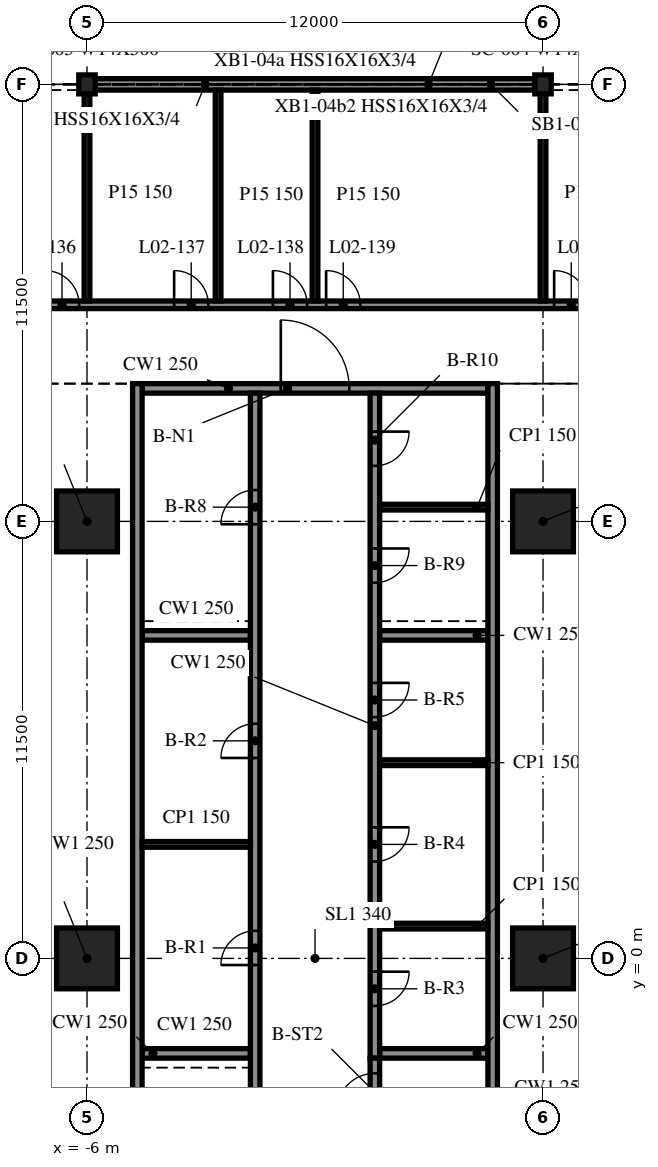
"""IFC4 building model, lengths in metres.
Left out: names, types, materials, properties, quantities, classifications, styles, units other than length and angle.
Written with IfcOpenShell. Run it as: python <this file> out.ifc"""

import sys

from ifc_helpers import new_model, si_unit, direction, frame, frame_2d, origin, origin_2d, place, context, subcontext, project, spatial, rectangle, i_section, extrude, element, fill, save


model = new_model("IFC4")
c1 = context("Model", 3, precision=1e-05, world=origin(), true_north=direction((0.0, 1.0)))
c2 = subcontext(c1, "Body", "Model", "MODEL_VIEW")
j1 = project(units=[si_unit("LENGTHUNIT", "METRE"), si_unit("PLANEANGLEUNIT", "RADIAN")], contexts=[c1])
p1 = place(None, origin())
s1 = spatial("IfcSite", under=j1, at=p1, CompositionType="ELEMENT")
p2 = place(p1, origin())
s2 = spatial("IfcBuilding", under=s1, at=p2, CompositionType="ELEMENT")
p3 = place(p2, frame((0.0, 0.0, 11.5)))
s3 = spatial("IfcBuildingStorey", under=s2, at=p3, CompositionType="ELEMENT", Elevation=11.5)
for number, where, z_axis, x_axis in (
    (1, (-6.0, 0.0, -0.34), (0.0, 0.0, 1.0), (1.0, 0.0, 0.0)),
    (2, (-6.0, 11.5, -0.34), (0.0, 0.0, 1.0), (1.0, 0.0, 0.0)),
    (3, (6.0, 0.0, -0.34), (0.0, 0.0, 1.0), (1.0, 0.0, 0.0)),
    (4, (6.0, 11.5, -0.34), (0.0, 0.0, 1.0), (1.0, 0.0, 0.0)),
):
    element("IfcColumn", number, at=place(p3, frame(where, z_axis=z_axis, x_axis=x_axis)), inside=s3, PredefinedType="COLUMN", context=c2, shape_type="SweptSolid", body=[
        extrude(rectangle(XDim=1.6, YDim=1.6, at=origin_2d()), origin(), (0.0, 0.0, 1.0), 4.3),
    ])
for number, where, z_axis, x_axis in (
    (5, (6.0, 23.0, -0.34), (0.0, 0.0, 1.0), (1.0, 0.0, 0.0)),
    (6, (-6.0, 23.0, -0.34), (0.0, 0.0, 1.0), (1.0, 0.0, 0.0)),
):
    element("IfcColumn", number, at=place(p3, frame(where, z_axis=z_axis, x_axis=x_axis)), inside=s3, PredefinedType="COLUMN", context=c2, shape_type="SweptSolid", body=[
        extrude(i_section(OverallWidth=0.432, OverallDepth=0.498, WebThickness=0.056, FlangeThickness=0.089, at=origin_2d()), origin(), (0.0, 0.0, 1.0), 4.3),
    ])
p4 = place(p3, frame((5.972, 23.0, 0.0), z_axis=(0.0, 0.0, 1.0), x_axis=(-1.0, 0.0, 0.0)))
e7 = element("IfcWall", 7, at=p4, inside=s3, PredefinedType="NOTDEFINED", context=c2, shape_type="SweptSolid", body=[
    extrude(rectangle(XDim=11.944, YDim=0.3, at=frame_2d((5.972, 0.0))), origin(), (0.0, 0.0, 1.0), 3.203),
])
for number, where, z_axis, x_axis in (
    (8, (-4.675, 15.125, 0.0), (0.0, 0.0, 1.0), (0.0, -1.0, 0.0)),
    (9, (4.675, -9.125, 0.0), (0.0, 0.0, 1.0), (0.0, 1.0, 0.0)),
):
    element("IfcWall", number, at=place(p3, frame(where, z_axis=z_axis, x_axis=x_axis)), inside=s3, PredefinedType="SOLIDWALL", context=c2, shape_type="SweptSolid", body=[
        extrude(rectangle(XDim=24.25, YDim=0.25, at=frame_2d((12.125, 0.0))), origin(), (0.0, 0.0, 1.0), 3.96),
    ])
p5 = place(p3, frame((-4.55, 15.0, 0.0), z_axis=(0.0, 0.0, 1.0), x_axis=(1.0, 0.0, 0.0)))
e10 = element("IfcWall", 10, at=p5, inside=s3, PredefinedType="SOLIDWALL", context=c2, shape_type="SweptSolid", body=[
    extrude(rectangle(XDim=9.1, YDim=0.25, at=frame_2d((4.55, 0.0))), origin(), (0.0, 0.0, 1.0), 3.96),
])
p6 = place(p5, frame((3.65, 0.0, 0.0)))
e11 = element("IfcOpeningElement", 11, at=p6, cuts=e10, PredefinedType="OPENING", context=c2, shape_type="SweptSolid", body=[
    extrude(rectangle(XDim=1.8, YDim=2.1, at=frame_2d((0.9, 1.05))), frame((0.0, 0.135, 0.0), z_axis=(0.0, -1.0, 0.0), x_axis=(1.0, 0.0, 0.0)), (0.0, 0.0, 1.0), 0.27),
])
p7 = place(p3, frame((-1.575, -8.875, 0.0), z_axis=(0.0, 0.0, 1.0), x_axis=(0.0, 1.0, 0.0)))
e12 = element("IfcWall", 12, at=p7, inside=s3, PredefinedType="SOLIDWALL", context=c2, shape_type="SweptSolid", body=[
    extrude(rectangle(XDim=23.75, YDim=0.25, at=frame_2d((11.875, 0.0))), origin(), (0.0, 0.0, 1.0), 3.96),
])
p8 = place(p7, frame((8.7, 0.0, 0.0)))
e13 = element("IfcOpeningElement", 13, at=p8, cuts=e12, PredefinedType="OPENING", context=c2, shape_type="SweptSolid", body=[
    extrude(rectangle(XDim=0.9, YDim=2.1, at=frame_2d((0.45, 1.05))), frame((0.0, 0.135, 0.0), z_axis=(0.0, -1.0, 0.0), x_axis=(1.0, 0.0, 0.0)), (0.0, 0.0, 1.0), 0.27),
])
p9 = place(p7, frame((14.15, 0.0, 0.0)))
e14 = element("IfcOpeningElement", 14, at=p9, cuts=e12, PredefinedType="OPENING", context=c2, shape_type="SweptSolid", body=[
    extrude(rectangle(XDim=0.9, YDim=2.1, at=frame_2d((0.45, 1.05))), frame((0.0, 0.135, 0.0), z_axis=(0.0, -1.0, 0.0), x_axis=(1.0, 0.0, 0.0)), (0.0, 0.0, 1.0), 0.27),
])
p10 = place(p7, frame((0.712, 0.0, 0.0)))
e15 = element("IfcOpeningElement", 15, at=p10, cuts=e12, PredefinedType="OPENING", context=c2, shape_type="SweptSolid", body=[
    extrude(rectangle(XDim=0.9, YDim=2.1, at=frame_2d((0.45, 1.05))), frame((0.0, 0.135, 0.0), z_axis=(0.0, -1.0, 0.0), x_axis=(1.0, 0.0, 0.0)), (0.0, 0.0, 1.0), 0.27),
])
p11 = place(p7, frame((3.788, 0.0, 0.0)))
e16 = element("IfcOpeningElement", 16, at=p11, cuts=e12, PredefinedType="OPENING", context=c2, shape_type="SweptSolid", body=[
    extrude(rectangle(XDim=0.9, YDim=2.1, at=frame_2d((0.45, 1.05))), frame((0.0, 0.135, 0.0), z_axis=(0.0, -1.0, 0.0), x_axis=(1.0, 0.0, 0.0)), (0.0, 0.0, 1.0), 0.27),
])
p12 = place(p7, frame((20.3, 0.0, 0.0)))
e17 = element("IfcOpeningElement", 17, at=p12, cuts=e12, PredefinedType="OPENING", context=c2, shape_type="SweptSolid", body=[
    extrude(rectangle(XDim=0.9, YDim=2.1, at=frame_2d((0.45, 1.05))), frame((0.0, 0.135, 0.0), z_axis=(0.0, -1.0, 0.0), x_axis=(1.0, 0.0, 0.0)), (0.0, 0.0, 1.0), 0.27),
])
p13 = place(p3, frame((1.575, -8.875, 0.0), z_axis=(0.0, 0.0, 1.0), x_axis=(0.0, 1.0, 0.0)))
e18 = element("IfcWall", 18, at=p13, inside=s3, PredefinedType="SOLIDWALL", context=c2, shape_type="SweptSolid", body=[
    extrude(rectangle(XDim=6.25, YDim=0.25, at=frame_2d((3.125, 0.0))), origin(), (0.0, 0.0, 1.0), 3.96),
])
p14 = place(p13, frame((4.85, 0.0, 0.0)))
e19 = element("IfcOpeningElement", 19, at=p14, cuts=e18, PredefinedType="OPENING", context=c2, shape_type="SweptSolid", body=[
    extrude(rectangle(XDim=1.0, YDim=2.1, at=frame_2d((0.5, 1.05))), frame((0.0, 0.135, 0.0), z_axis=(0.0, -1.0, 0.0), x_axis=(1.0, 0.0, 0.0)), (0.0, 0.0, 1.0), 0.27),
])
p15 = place(p3, frame((1.575, 14.875, 0.0), z_axis=(0.0, 0.0, 1.0), x_axis=(0.0, -1.0, 0.0)))
e20 = element("IfcWall", 20, at=p15, inside=s3, PredefinedType="SOLIDWALL", context=c2, shape_type="SweptSolid", body=[
    extrude(rectangle(XDim=17.5, YDim=0.25, at=frame_2d((8.75, 0.0))), origin(), (0.0, 0.0, 1.0), 3.96),
])
p16 = place(p15, frame((15.225, 0.0, 0.0)))
e21 = element("IfcOpeningElement", 21, at=p16, cuts=e20, PredefinedType="OPENING", context=c2, shape_type="SweptSolid", body=[
    extrude(rectangle(XDim=0.9, YDim=2.1, at=frame_2d((0.45, 1.05))), frame((0.0, 0.135, 0.0), z_axis=(0.0, -1.0, 0.0), x_axis=(1.0, 0.0, 0.0)), (0.0, 0.0, 1.0), 0.27),
])
p17 = place(p15, frame((11.425, 0.0, 0.0)))
e22 = element("IfcOpeningElement", 22, at=p17, cuts=e20, PredefinedType="OPENING", context=c2, shape_type="SweptSolid", body=[
    extrude(rectangle(XDim=0.9, YDim=2.1, at=frame_2d((0.45, 1.05))), frame((0.0, 0.135, 0.0), z_axis=(0.0, -1.0, 0.0), x_axis=(1.0, 0.0, 0.0)), (0.0, 0.0, 1.0), 0.27),
])
p18 = place(p15, frame((7.625, 0.0, 0.0)))
e23 = element("IfcOpeningElement", 23, at=p18, cuts=e20, PredefinedType="OPENING", context=c2, shape_type="SweptSolid", body=[
    extrude(rectangle(XDim=0.9, YDim=2.1, at=frame_2d((0.45, 1.05))), frame((0.0, 0.135, 0.0), z_axis=(0.0, -1.0, 0.0), x_axis=(1.0, 0.0, 0.0)), (0.0, 0.0, 1.0), 0.27),
])
p19 = place(p15, frame((4.087, 0.0, 0.0)))
e24 = element("IfcOpeningElement", 24, at=p19, cuts=e20, PredefinedType="OPENING", context=c2, shape_type="SweptSolid", body=[
    extrude(rectangle(XDim=0.9, YDim=2.1, at=frame_2d((0.45, 1.05))), frame((0.0, 0.135, 0.0), z_axis=(0.0, -1.0, 0.0), x_axis=(1.0, 0.0, 0.0)), (0.0, 0.0, 1.0), 0.27),
])
p20 = place(p15, frame((1.012, 0.0, 0.0)))
e25 = element("IfcOpeningElement", 25, at=p20, cuts=e20, PredefinedType="OPENING", context=c2, shape_type="SweptSolid", body=[
    extrude(rectangle(XDim=0.9, YDim=2.1, at=frame_2d((0.45, 1.05))), frame((0.0, 0.135, 0.0), z_axis=(0.0, -1.0, 0.0), x_axis=(1.0, 0.0, 0.0)), (0.0, 0.0, 1.0), 0.27),
])
for number, where, z_axis, x_axis in (
    (26, (-4.55, -2.5, 0.0), (0.0, 0.0, 1.0), (1.0, 0.0, 0.0)),
    (27, (-4.55, 8.5, 0.0), (0.0, 0.0, 1.0), (1.0, 0.0, 0.0)),
    (28, (1.7, -2.5, 0.0), (0.0, 0.0, 1.0), (1.0, 0.0, 0.0)),
    (29, (1.7, 8.5, 0.0), (0.0, 0.0, 1.0), (1.0, 0.0, 0.0)),
):
    element("IfcWall", number, at=place(p3, frame(where, z_axis=z_axis, x_axis=x_axis)), inside=s3, PredefinedType="SOLIDWALL", context=c2, shape_type="SweptSolid", body=[
        extrude(rectangle(XDim=2.85, YDim=0.25, at=frame_2d((1.425, 0.0))), origin(), (0.0, 0.0, 1.0), 3.96),
    ])
for number, where, z_axis, x_axis in (
    (30, (-4.55, 3.0, 0.0), (0.0, 0.0, 1.0), (1.0, 0.0, 0.0)),
    (31, (1.7, 0.85, 0.0), (0.0, 0.0, 1.0), (1.0, 0.0, 0.0)),
    (32, (1.7, 5.15, 0.0), (0.0, 0.0, 1.0), (1.0, 0.0, 0.0)),
    (33, (1.7, 11.875, 0.0), (0.0, 0.0, 1.0), (1.0, 0.0, 0.0)),
):
    element("IfcWall", number, at=place(p3, frame(where, z_axis=z_axis, x_axis=x_axis)), inside=s3, PredefinedType="PARTITIONING", context=c2, shape_type="SweptSolid", body=[
        extrude(rectangle(XDim=2.85, YDim=0.15, at=frame_2d((1.425, 0.0))), origin(), (0.0, 0.0, 1.0), 3.96),
    ])
p21 = place(p3, frame((-47.807, 17.2, 0.0), z_axis=(0.0, 0.0, 1.0), x_axis=(1.0, 0.0, 0.0)))
e34 = element("IfcWall", 34, at=p21, inside=s3, PredefinedType="PARTITIONING", context=c2, shape_type="SweptSolid", body=[
    extrude(rectangle(XDim=95.615, YDim=0.2, at=frame_2d((47.807, 0.0))), origin(), (0.0, 0.0, 1.0), 3.96),
])
p22 = place(p21, frame((4.7, 0.0, 0.0)))
e35 = element("IfcOpeningElement", 35, at=p22, cuts=e34, PredefinedType="OPENING", context=c2, shape_type="SweptSolid", body=[
    extrude(rectangle(XDim=0.9, YDim=2.1, at=frame_2d((0.45, 1.05))), frame((0.0, 0.11, 0.0), z_axis=(0.0, -1.0, 0.0), x_axis=(1.0, 0.0, 0.0)), (0.0, 0.0, 1.0), 0.22),
])
p23 = place(p21, frame((16.7, 0.0, 0.0)))
e36 = element("IfcOpeningElement", 36, at=p23, cuts=e34, PredefinedType="OPENING", context=c2, shape_type="SweptSolid", body=[
    extrude(rectangle(XDim=0.9, YDim=2.1, at=frame_2d((0.45, 1.05))), frame((0.0, 0.11, 0.0), z_axis=(0.0, -1.0, 0.0), x_axis=(1.0, 0.0, 0.0)), (0.0, 0.0, 1.0), 0.22),
])
p24 = place(p21, frame((20.1, 0.0, 0.0)))
e37 = element("IfcOpeningElement", 37, at=p24, cuts=e34, PredefinedType="OPENING", context=c2, shape_type="SweptSolid", body=[
    extrude(rectangle(XDim=0.9, YDim=2.1, at=frame_2d((0.45, 1.05))), frame((0.0, 0.11, 0.0), z_axis=(0.0, -1.0, 0.0), x_axis=(1.0, 0.0, 0.0)), (0.0, 0.0, 1.0), 0.22),
])
p25 = place(p21, frame((22.7, 0.0, 0.0)))
e38 = element("IfcOpeningElement", 38, at=p25, cuts=e34, PredefinedType="OPENING", context=c2, shape_type="SweptSolid", body=[
    extrude(rectangle(XDim=0.9, YDim=2.1, at=frame_2d((0.45, 1.05))), frame((0.0, 0.11, 0.0), z_axis=(0.0, -1.0, 0.0), x_axis=(1.0, 0.0, 0.0)), (0.0, 0.0, 1.0), 0.22),
])
p26 = place(p21, frame((28.7, 0.0, 0.0)))
e39 = element("IfcOpeningElement", 39, at=p26, cuts=e34, PredefinedType="OPENING", context=c2, shape_type="SweptSolid", body=[
    extrude(rectangle(XDim=0.9, YDim=2.1, at=frame_2d((0.45, 1.05))), frame((0.0, 0.11, 0.0), z_axis=(0.0, -1.0, 0.0), x_axis=(1.0, 0.0, 0.0)), (0.0, 0.0, 1.0), 0.22),
])
p27 = place(p21, frame((40.7, 0.0, 0.0)))
e40 = element("IfcOpeningElement", 40, at=p27, cuts=e34, PredefinedType="OPENING", context=c2, shape_type="SweptSolid", body=[
    extrude(rectangle(XDim=0.9, YDim=2.1, at=frame_2d((0.45, 1.05))), frame((0.0, 0.11, 0.0), z_axis=(0.0, -1.0, 0.0), x_axis=(1.0, 0.0, 0.0)), (0.0, 0.0, 1.0), 0.22),
])
p28 = place(p21, frame((44.1, 0.0, 0.0)))
e41 = element("IfcOpeningElement", 41, at=p28, cuts=e34, PredefinedType="OPENING", context=c2, shape_type="SweptSolid", body=[
    extrude(rectangle(XDim=0.9, YDim=2.1, at=frame_2d((0.45, 1.05))), frame((0.0, 0.11, 0.0), z_axis=(0.0, -1.0, 0.0), x_axis=(1.0, 0.0, 0.0)), (0.0, 0.0, 1.0), 0.22),
])
p29 = place(p21, frame((46.7, 0.0, 0.0)))
e42 = element("IfcOpeningElement", 42, at=p29, cuts=e34, PredefinedType="OPENING", context=c2, shape_type="SweptSolid", body=[
    extrude(rectangle(XDim=0.9, YDim=2.1, at=frame_2d((0.45, 1.05))), frame((0.0, 0.11, 0.0), z_axis=(0.0, -1.0, 0.0), x_axis=(1.0, 0.0, 0.0)), (0.0, 0.0, 1.0), 0.22),
])
p30 = place(p21, frame((48.1, 0.0, 0.0)))
e43 = element("IfcOpeningElement", 43, at=p30, cuts=e34, PredefinedType="OPENING", context=c2, shape_type="SweptSolid", body=[
    extrude(rectangle(XDim=0.9, YDim=2.1, at=frame_2d((0.45, 1.05))), frame((0.0, 0.11, 0.0), z_axis=(0.0, -1.0, 0.0), x_axis=(1.0, 0.0, 0.0)), (0.0, 0.0, 1.0), 0.22),
])
p31 = place(p21, frame((54.1, 0.0, 0.0)))
e44 = element("IfcOpeningElement", 44, at=p31, cuts=e34, PredefinedType="OPENING", context=c2, shape_type="SweptSolid", body=[
    extrude(rectangle(XDim=0.9, YDim=2.1, at=frame_2d((0.45, 1.05))), frame((0.0, 0.11, 0.0), z_axis=(0.0, -1.0, 0.0), x_axis=(1.0, 0.0, 0.0)), (0.0, 0.0, 1.0), 0.22),
])
p32 = place(p21, frame((66.1, 0.0, 0.0)))
e45 = element("IfcOpeningElement", 45, at=p32, cuts=e34, PredefinedType="OPENING", context=c2, shape_type="SweptSolid", body=[
    extrude(rectangle(XDim=0.9, YDim=2.1, at=frame_2d((0.45, 1.05))), frame((0.0, 0.11, 0.0), z_axis=(0.0, -1.0, 0.0), x_axis=(1.0, 0.0, 0.0)), (0.0, 0.0, 1.0), 0.22),
])
p33 = place(p21, frame((69.5, 0.0, 0.0)))
e46 = element("IfcOpeningElement", 46, at=p33, cuts=e34, PredefinedType="OPENING", context=c2, shape_type="SweptSolid", body=[
    extrude(rectangle(XDim=0.9, YDim=2.1, at=frame_2d((0.45, 1.05))), frame((0.0, 0.11, 0.0), z_axis=(0.0, -1.0, 0.0), x_axis=(1.0, 0.0, 0.0)), (0.0, 0.0, 1.0), 0.22),
])
p34 = place(p21, frame((72.1, 0.0, 0.0)))
e47 = element("IfcOpeningElement", 47, at=p34, cuts=e34, PredefinedType="OPENING", context=c2, shape_type="SweptSolid", body=[
    extrude(rectangle(XDim=0.9, YDim=2.1, at=frame_2d((0.45, 1.05))), frame((0.0, 0.11, 0.0), z_axis=(0.0, -1.0, 0.0), x_axis=(1.0, 0.0, 0.0)), (0.0, 0.0, 1.0), 0.22),
])
p35 = place(p21, frame((78.1, 0.0, 0.0)))
e48 = element("IfcOpeningElement", 48, at=p35, cuts=e34, PredefinedType="OPENING", context=c2, shape_type="SweptSolid", body=[
    extrude(rectangle(XDim=0.9, YDim=2.1, at=frame_2d((0.45, 1.05))), frame((0.0, 0.11, 0.0), z_axis=(0.0, -1.0, 0.0), x_axis=(1.0, 0.0, 0.0)), (0.0, 0.0, 1.0), 0.22),
])
p36 = place(p21, frame((90.1, 0.0, 0.0)))
e49 = element("IfcOpeningElement", 49, at=p36, cuts=e34, PredefinedType="OPENING", context=c2, shape_type="SweptSolid", body=[
    extrude(rectangle(XDim=0.9, YDim=2.1, at=frame_2d((0.45, 1.05))), frame((0.0, 0.11, 0.0), z_axis=(0.0, -1.0, 0.0), x_axis=(1.0, 0.0, 0.0)), (0.0, 0.0, 1.0), 0.22),
])
p37 = place(p3, frame((-6.0, 17.3, 0.0), z_axis=(0.0, 0.0, 1.0), x_axis=(0.0, 1.0, 0.0)))
e50 = element("IfcWall", 50, at=p37, inside=s3, PredefinedType="PARTITIONING", context=c2, shape_type="SweptSolid", body=[
    extrude(rectangle(XDim=5.675, YDim=0.15, at=frame_2d((2.837, 0.0))), origin(), (0.0, 0.0, 1.0), 3.96),
])
for number, where, z_axis, x_axis in (
    (51, (-2.55, 17.3, 0.0), (0.0, 0.0, 1.0), (0.0, 1.0, 0.0)),
    (52, (0.0, 17.3, 0.0), (0.0, 0.0, 1.0), (0.0, 1.0, 0.0)),
):
    element("IfcWall", number, at=place(p3, frame(where, z_axis=z_axis, x_axis=x_axis)), inside=s3, PredefinedType="PARTITIONING", context=c2, shape_type="SweptSolid", body=[
        extrude(rectangle(XDim=5.55, YDim=0.15, at=frame_2d((2.775, 0.0))), origin(), (0.0, 0.0, 1.0), 3.96),
    ])
p38 = place(p3, frame((6.0, 17.3, 0.0), z_axis=(0.0, 0.0, 1.0), x_axis=(0.0, 1.0, 0.0)))
e53 = element("IfcWall", 53, at=p38, inside=s3, PredefinedType="PARTITIONING", context=c2, shape_type="SweptSolid", body=[
    extrude(rectangle(XDim=5.675, YDim=0.15, at=frame_2d((2.837, 0.0))), origin(), (0.0, 0.0, 1.0), 3.96),
])
p39 = place(p6, origin())
e54 = element("IfcDoor", 54, at=p39, inside=s3, OperationType="DOUBLE_DOOR_SINGLE_SWING", PredefinedType="DOOR", context=c2, shape_type="SweptSolid", body=[
    extrude(rectangle(XDim=1.8, YDim=2.1, at=frame_2d((0.9, 1.05))), frame((0.0, 0.025, 0.0), z_axis=(0.0, -1.0, 0.0), x_axis=(1.0, 0.0, 0.0)), (0.0, 0.0, 1.0), 0.05),
])
fill(e11, e54)
p40 = place(p8, origin())
e55 = element("IfcDoor", 55, at=p40, inside=s3, OperationType="SINGLE_SWING_LEFT", PredefinedType="DOOR", context=c2, shape_type="SweptSolid", body=[
    extrude(rectangle(XDim=0.9, YDim=2.1, at=frame_2d((0.45, 1.05))), frame((0.0, 0.025, 0.0), z_axis=(0.0, -1.0, 0.0), x_axis=(1.0, 0.0, 0.0)), (0.0, 0.0, 1.0), 0.05),
])
fill(e13, e55)
p41 = place(p9, origin())
e56 = element("IfcDoor", 56, at=p41, inside=s3, OperationType="SINGLE_SWING_RIGHT", PredefinedType="DOOR", context=c2, shape_type="SweptSolid", body=[
    extrude(rectangle(XDim=0.9, YDim=2.1, at=frame_2d((0.45, 1.05))), frame((0.0, 0.025, 0.0), z_axis=(0.0, -1.0, 0.0), x_axis=(1.0, 0.0, 0.0)), (0.0, 0.0, 1.0), 0.05),
])
fill(e14, e56)
p42 = place(p16, origin())
e57 = element("IfcDoor", 57, at=p42, inside=s3, OperationType="SINGLE_SWING_LEFT", PredefinedType="DOOR", context=c2, shape_type="SweptSolid", body=[
    extrude(rectangle(XDim=0.9, YDim=2.1, at=frame_2d((0.45, 1.05))), frame((0.0, 0.025, 0.0), z_axis=(0.0, -1.0, 0.0), x_axis=(1.0, 0.0, 0.0)), (0.0, 0.0, 1.0), 0.05),
])
fill(e21, e57)
p43 = place(p17, origin())
e58 = element("IfcDoor", 58, at=p43, inside=s3, OperationType="SINGLE_SWING_RIGHT", PredefinedType="DOOR", context=c2, shape_type="SweptSolid", body=[
    extrude(rectangle(XDim=0.9, YDim=2.1, at=frame_2d((0.45, 1.05))), frame((0.0, 0.025, 0.0), z_axis=(0.0, -1.0, 0.0), x_axis=(1.0, 0.0, 0.0)), (0.0, 0.0, 1.0), 0.05),
])
fill(e22, e58)
p44 = place(p18, origin())
e59 = element("IfcDoor", 59, at=p44, inside=s3, OperationType="SINGLE_SWING_LEFT", PredefinedType="DOOR", context=c2, shape_type="SweptSolid", body=[
    extrude(rectangle(XDim=0.9, YDim=2.1, at=frame_2d((0.45, 1.05))), frame((0.0, 0.025, 0.0), z_axis=(0.0, -1.0, 0.0), x_axis=(1.0, 0.0, 0.0)), (0.0, 0.0, 1.0), 0.05),
])
fill(e23, e59)
p45 = place(p12, origin())
e60 = element("IfcDoor", 60, at=p45, inside=s3, OperationType="SINGLE_SWING_RIGHT", PredefinedType="DOOR", context=c2, shape_type="SweptSolid", body=[
    extrude(rectangle(XDim=0.9, YDim=2.1, at=frame_2d((0.45, 1.05))), frame((0.0, 0.025, 0.0), z_axis=(0.0, -1.0, 0.0), x_axis=(1.0, 0.0, 0.0)), (0.0, 0.0, 1.0), 0.05),
])
fill(e17, e60)
p46 = place(p19, origin())
e61 = element("IfcDoor", 61, at=p46, inside=s3, OperationType="SINGLE_SWING_LEFT", PredefinedType="DOOR", context=c2, shape_type="SweptSolid", body=[
    extrude(rectangle(XDim=0.9, YDim=2.1, at=frame_2d((0.45, 1.05))), frame((0.0, 0.025, 0.0), z_axis=(0.0, -1.0, 0.0), x_axis=(1.0, 0.0, 0.0)), (0.0, 0.0, 1.0), 0.05),
])
fill(e24, e61)
p47 = place(p20, origin())
e62 = element("IfcDoor", 62, at=p47, inside=s3, OperationType="SINGLE_SWING_RIGHT", PredefinedType="DOOR", context=c2, shape_type="SweptSolid", body=[
    extrude(rectangle(XDim=0.9, YDim=2.1, at=frame_2d((0.45, 1.05))), frame((0.0, 0.025, 0.0), z_axis=(0.0, -1.0, 0.0), x_axis=(1.0, 0.0, 0.0)), (0.0, 0.0, 1.0), 0.05),
])
fill(e25, e62)
p48 = place(p14, origin())
e63 = element("IfcDoor", 63, at=p48, inside=s3, OperationType="SINGLE_SWING_LEFT", PredefinedType="DOOR", context=c2, shape_type="SweptSolid", body=[
    extrude(rectangle(XDim=1.0, YDim=2.1, at=frame_2d((0.5, 1.05))), frame((0.0, 0.025, 0.0), z_axis=(0.0, -1.0, 0.0), x_axis=(1.0, 0.0, 0.0)), (0.0, 0.0, 1.0), 0.05),
])
fill(e19, e63)
p49 = place(p27, origin())
e64 = element("IfcDoor", 64, at=p49, inside=s3, OperationType="SINGLE_SWING_LEFT", PredefinedType="DOOR", context=c2, shape_type="SweptSolid", body=[
    extrude(rectangle(XDim=0.9, YDim=2.1, at=frame_2d((0.45, 1.05))), frame((0.0, 0.025, 0.0), z_axis=(0.0, -1.0, 0.0), x_axis=(1.0, 0.0, 0.0)), (0.0, 0.0, 1.0), 0.05),
])
fill(e40, e64)
p50 = place(p28, origin())
e65 = element("IfcDoor", 65, at=p50, inside=s3, OperationType="SINGLE_SWING_LEFT", PredefinedType="DOOR", context=c2, shape_type="SweptSolid", body=[
    extrude(rectangle(XDim=0.9, YDim=2.1, at=frame_2d((0.45, 1.05))), frame((0.0, 0.025, 0.0), z_axis=(0.0, -1.0, 0.0), x_axis=(1.0, 0.0, 0.0)), (0.0, 0.0, 1.0), 0.05),
])
fill(e41, e65)
p51 = place(p29, origin())
e66 = element("IfcDoor", 66, at=p51, inside=s3, OperationType="SINGLE_SWING_LEFT", PredefinedType="DOOR", context=c2, shape_type="SweptSolid", body=[
    extrude(rectangle(XDim=0.9, YDim=2.1, at=frame_2d((0.45, 1.05))), frame((0.0, 0.025, 0.0), z_axis=(0.0, -1.0, 0.0), x_axis=(1.0, 0.0, 0.0)), (0.0, 0.0, 1.0), 0.05),
])
fill(e42, e66)
p52 = place(p30, origin())
e67 = element("IfcDoor", 67, at=p52, inside=s3, OperationType="SINGLE_SWING_RIGHT", PredefinedType="DOOR", context=c2, shape_type="SweptSolid", body=[
    extrude(rectangle(XDim=0.9, YDim=2.1, at=frame_2d((0.45, 1.05))), frame((0.0, 0.025, 0.0), z_axis=(0.0, -1.0, 0.0), x_axis=(1.0, 0.0, 0.0)), (0.0, 0.0, 1.0), 0.05),
])
fill(e43, e67)
p53 = place(p31, origin())
e68 = element("IfcDoor", 68, at=p53, inside=s3, OperationType="SINGLE_SWING_RIGHT", PredefinedType="DOOR", context=c2, shape_type="SweptSolid", body=[
    extrude(rectangle(XDim=0.9, YDim=2.1, at=frame_2d((0.45, 1.05))), frame((0.0, 0.025, 0.0), z_axis=(0.0, -1.0, 0.0), x_axis=(1.0, 0.0, 0.0)), (0.0, 0.0, 1.0), 0.05),
])
fill(e44, e68)
save(model, sys.argv[1])
